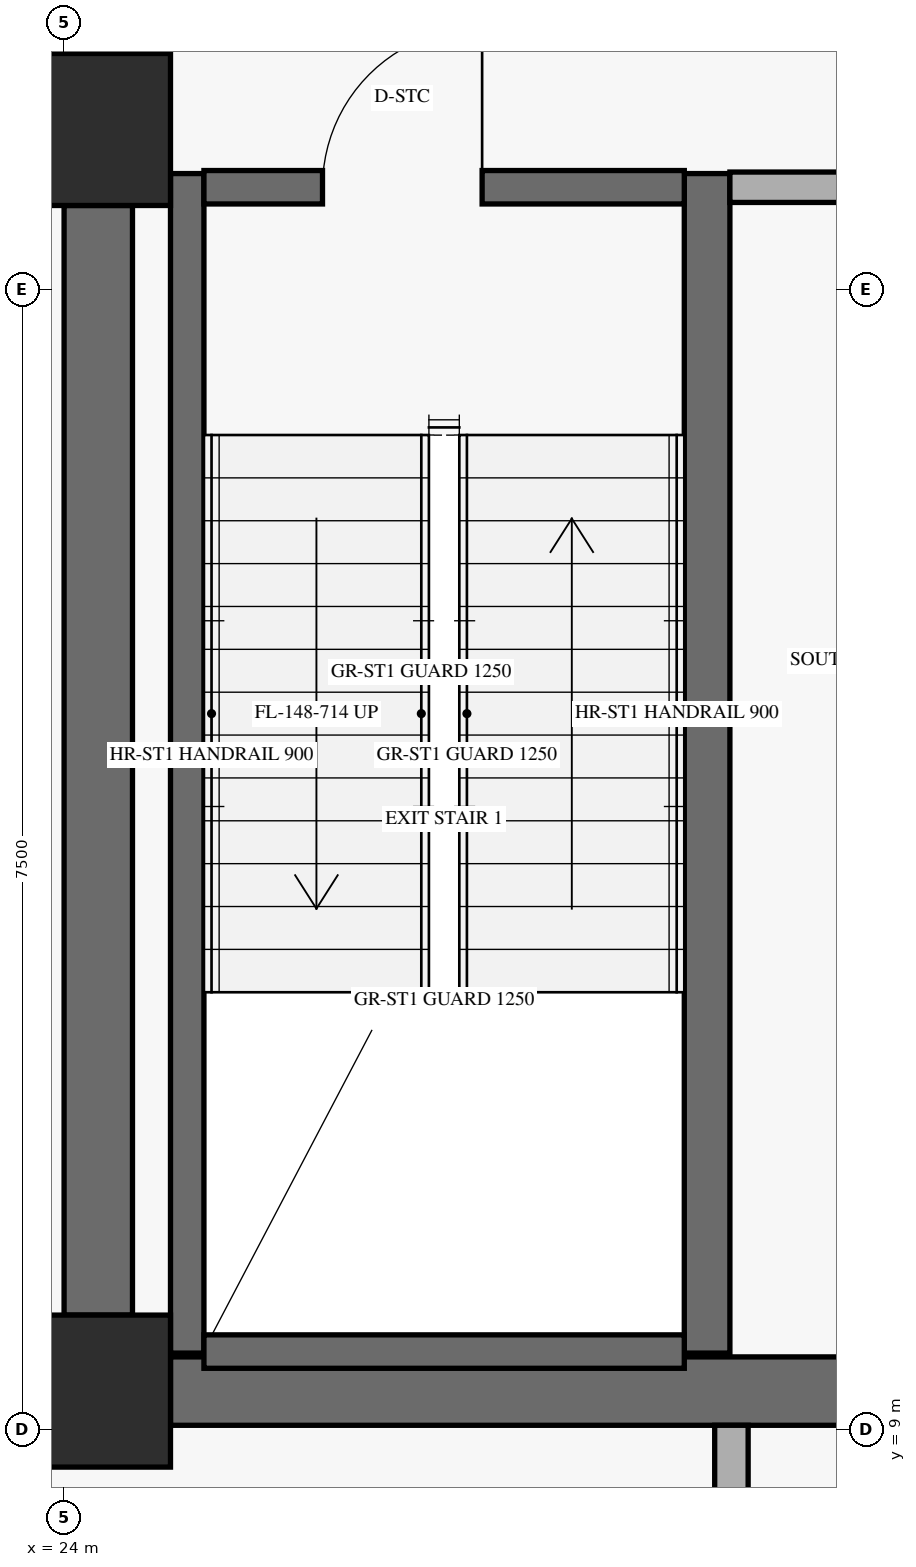
"""IFC4 building model, lengths in metres.
Left out: names, types, materials, properties, quantities, classifications, styles, units other than length and angle.
Written with IfcOpenShell. Run it as: python <this file> out.ifc"""

import sys

from ifc_helpers import new_model, si_unit, direction, frame, frame_2d, origin, origin_2d, place, context, subcontext, project, spatial, rectangle, extrude, element, fill, save


model = new_model("IFC4")
c1 = context("Model", 3, precision=1e-05, world=origin(), true_north=direction((0.0, 1.0)))
c2 = subcontext(c1, "Body", "Model", "MODEL_VIEW")
j1 = project(units=[si_unit("LENGTHUNIT", "METRE"), si_unit("PLANEANGLEUNIT", "RADIAN")], contexts=[c1])
p1 = place(None, origin())
s1 = spatial("IfcSite", under=j1, at=p1, CompositionType="ELEMENT")
p2 = place(p1, origin())
s2 = spatial("IfcBuilding", under=s1, at=p2, CompositionType="ELEMENT")
p3 = place(p2, origin())
s3 = spatial("IfcBuildingStorey", under=s2, at=p3, CompositionType="ELEMENT", Elevation=0.0)
p4 = place(p3, frame((24.225, 9.75, 0.0), z_axis=(0.0, 0.0, 1.0), x_axis=(0.0, 1.0, 0.0)))
e1 = element("IfcWall", 1, at=p4, inside=s3, PredefinedType="SHEAR", context=c2, shape_type="SweptSolid", body=[
    extrude(rectangle(XDim=7.3, YDim=0.45, at=frame_2d((3.65, 0.0))), origin(), (0.0, 0.0, 1.0), 3.539),
])
p5 = place(p3, frame((24.225, 18.05, 0.0), z_axis=(0.0, 0.0, 1.0), x_axis=(0.0, 1.0, 0.0)))
e2 = element("IfcWall", 2, at=p5, inside=s3, PredefinedType="SHEAR", context=c2, shape_type="SweptSolid", body=[
    extrude(rectangle(XDim=11.65, YDim=0.45, at=frame_2d((5.825, 0.0))), origin(), (0.0, 0.0, 1.0), 3.539),
])
p6 = place(p3, frame((24.7, 9.25, 0.0), z_axis=(0.0, 0.0, 1.0), x_axis=(1.0, 0.0, 0.0)))
e3 = element("IfcWall", 3, at=p6, inside=s3, PredefinedType="SHEAR", context=c2, shape_type="SweptSolid", body=[
    extrude(rectangle(XDim=10.0, YDim=0.45, at=frame_2d((5.0, 0.0))), origin(), (0.0, 0.0, 1.0), 4.39),
])
p7 = place(p6, frame((5.2, 0.0, 0.0)))
e4 = element("IfcOpeningElement", 4, at=p7, cuts=e3, PredefinedType="OPENING", context=c2, shape_type="SweptSolid", body=[
    extrude(rectangle(XDim=1.1, YDim=2.15, at=frame_2d((0.55, 1.075))), frame((0.0, 0.235, 0.0), z_axis=(0.0, -1.0, 0.0), x_axis=(1.0, 0.0, 0.0)), (0.0, 0.0, 1.0), 0.47),
])
p8 = place(p3, frame((24.81, 9.5, 0.0), z_axis=(0.0, 0.0, 1.0), x_axis=(0.0, 1.0, 0.0)))
e5 = element("IfcWall", 5, at=p8, inside=s3, PredefinedType="SHEAR", context=c2, shape_type="SweptSolid", body=[
    extrude(rectangle(XDim=7.76, YDim=0.22, at=frame_2d((3.88, 0.0))), origin(), (0.0, 0.0, 1.0), 4.39),
])
p9 = place(p3, frame((28.23, 9.5, 0.0), z_axis=(0.0, 0.0, 1.0), x_axis=(0.0, 1.0, 0.0)))
e6 = element("IfcWall", 6, at=p9, inside=s3, PredefinedType="SHEAR", context=c2, shape_type="SweptSolid", body=[
    extrude(rectangle(XDim=7.76, YDim=0.3, at=frame_2d((3.88, 0.0))), origin(), (0.0, 0.0, 1.0), 4.39),
])
p10 = place(p3, frame((24.92, 9.51, 0.0), z_axis=(0.0, 0.0, 1.0), x_axis=(1.0, 0.0, 0.0)))
e7 = element("IfcWall", 7, at=p10, inside=s3, PredefinedType="SHEAR", context=c2, shape_type="SweptSolid", body=[
    extrude(rectangle(XDim=3.16, YDim=0.22, at=frame_2d((1.58, 0.0))), origin(), (0.0, 0.0, 1.0), 4.39),
])
p11 = place(p3, frame((24.92, 17.17, 0.0), z_axis=(0.0, 0.0, 1.0), x_axis=(1.0, 0.0, 0.0)))
e8 = element("IfcWall", 8, at=p11, inside=s3, PredefinedType="SHEAR", context=c2, shape_type="SweptSolid", body=[
    extrude(rectangle(XDim=3.16, YDim=0.22, at=frame_2d((1.58, 0.0))), origin(), (0.0, 0.0, 1.0), 4.39),
])
p12 = place(p11, frame((0.78, 0.0, 0.0)))
e9 = element("IfcOpeningElement", 9, at=p12, cuts=e8, PredefinedType="OPENING", context=c2, shape_type="SweptSolid", body=[
    extrude(rectangle(XDim=1.05, YDim=2.15, at=frame_2d((0.525, 1.075))), frame((0.0, 0.12, 0.0), z_axis=(0.0, -1.0, 0.0), x_axis=(1.0, 0.0, 0.0)), (0.0, 0.0, 1.0), 0.24),
])
for number, where, z_axis, x_axis in (
    (10, (24.2, 9.25, 0.0), (0.0, 0.0, 1.0), (1.0, 0.0, 0.0)),
    (11, (24.2, 17.55, 0.0), (0.0, 0.0, 1.0), (1.0, 0.0, 0.0)),
):
    element("IfcColumn", number, at=place(p3, frame(where, z_axis=z_axis, x_axis=x_axis)), inside=s3, PredefinedType="COLUMN", context=c2, shape_type="SweptSolid", body=[
        extrude(rectangle(XDim=1.0, YDim=1.0, at=origin_2d()), origin(), (0.0, 0.0, 1.0), 4.8),
    ])
p13 = place(p3, frame((28.38, 17.17, 0.0), z_axis=(0.0, 0.0, 1.0), x_axis=(1.0, 0.0, 0.0)))
e12 = element("IfcWall", 12, at=p13, inside=s3, PredefinedType="STANDARD", context=c2, shape_type="SweptSolid", body=[
    extrude(rectangle(XDim=2.9, YDim=0.2, at=frame_2d((1.45, 0.0))), origin(), (0.0, 0.0, 1.0), 4.39),
])
p14 = place(p13, frame((0.85, 0.0, 0.0)))
e13 = element("IfcOpeningElement", 13, at=p14, cuts=e12, PredefinedType="OPENING", context=c2, shape_type="SweptSolid", body=[
    extrude(rectangle(XDim=1.05, YDim=2.15, at=frame_2d((0.525, 1.075))), frame((0.0, 0.11, 0.0), z_axis=(0.0, -1.0, 0.0), x_axis=(1.0, 0.0, 0.0)), (0.0, 0.0, 1.0), 0.22),
])
p15 = place(p3, frame((28.39, 0.32, 0.0), z_axis=(0.0, 0.0, 1.0), x_axis=(0.0, 1.0, 0.0)))
e14 = element("IfcWall", 14, at=p15, inside=s3, PredefinedType="STANDARD", context=c2, shape_type="SweptSolid", body=[
    extrude(rectangle(XDim=8.705, YDim=0.22, at=frame_2d((4.353, 0.0))), origin(), (0.0, 0.0, 1.0), 3.761),
])
p16 = place(p3, frame((11.2, 9.25, 0.0), z_axis=(0.0, 0.0, 1.0), x_axis=(1.0, 0.0, 0.0)))
e15 = element("IfcWall", 15, at=p16, inside=s3, PredefinedType="PARTITIONING", context=c2, shape_type="SweptSolid", body=[
    extrude(rectangle(XDim=12.8, YDim=0.16, at=frame_2d((6.4, 0.0))), origin(), (0.0, 0.0, 1.0), 3.272),
])
p17 = place(p16, frame((7.77, 0.0, 0.0)))
e16 = element("IfcOpeningElement", 16, at=p17, cuts=e15, PredefinedType="OPENING", context=c2, shape_type="SweptSolid", body=[
    extrude(rectangle(XDim=1.15, YDim=2.15, at=frame_2d((0.575, 1.075))), frame((0.0, 0.09, 0.0), z_axis=(0.0, -1.0, 0.0), x_axis=(1.0, 0.0, 0.0)), (0.0, 0.0, 1.0), 0.18),
])
p18 = place(p12, frame((1.05, 0.0, 0.0), z_axis=(0.0, 0.0, 1.0), x_axis=(-1.0, 0.0, 0.0)))
e17 = element("IfcDoor", 17, at=p18, inside=s3, OperationType="SINGLE_SWING_LEFT", PredefinedType="DOOR", context=c2, shape_type="SweptSolid", body=[
    extrude(rectangle(XDim=1.05, YDim=2.15, at=frame_2d((0.525, 1.075))), frame((0.0, 0.025, 0.0), z_axis=(0.0, -1.0, 0.0), x_axis=(1.0, 0.0, 0.0)), (0.0, 0.0, 1.0), 0.05),
])
fill(e9, e17)
save(model, sys.argv[1])
